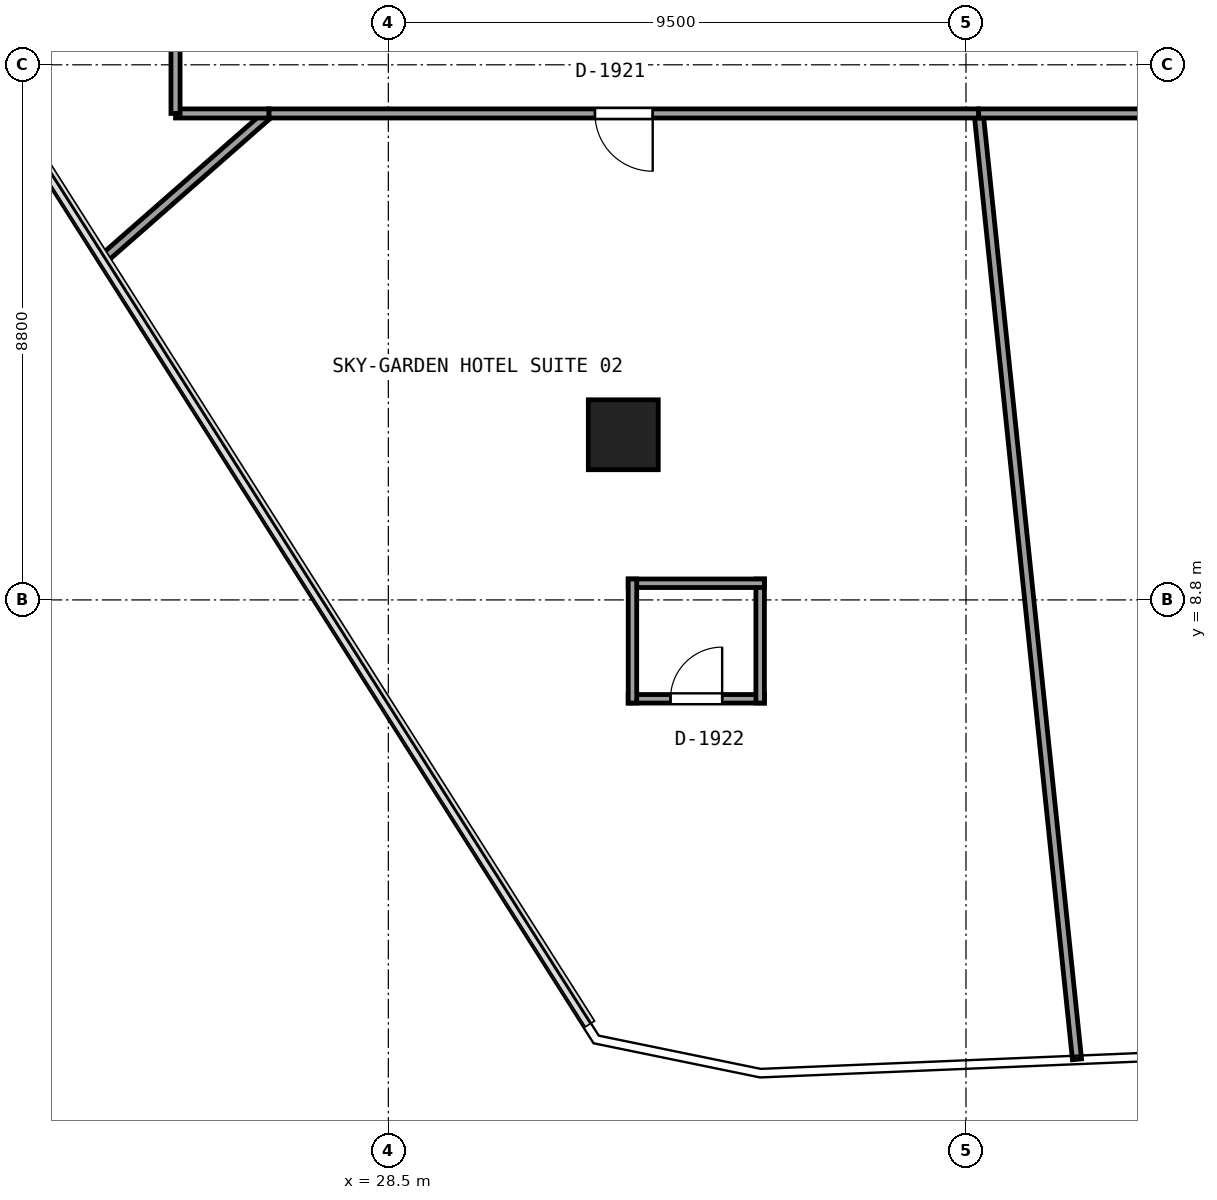
"""IFC4 building model, lengths in metres.
Left out: names, types, materials, properties, quantities, classifications, styles, units other than length and angle.
Written with IfcOpenShell. Run it as: python <this file> out.ifc"""

import sys

from ifc_helpers import new_model, si_unit, direction, frame, frame_2d, origin, origin_2d, place, context, subcontext, project, spatial, rectangle, extrude, element, fill, save


model = new_model("IFC4")
c1 = context("Model", 3, precision=1e-05, world=origin(), true_north=direction((0.0, 1.0)))
c2 = subcontext(c1, "Body", "Model", "MODEL_VIEW")
j1 = project(units=[si_unit("LENGTHUNIT", "METRE"), si_unit("PLANEANGLEUNIT", "RADIAN")], contexts=[c1])
p1 = place(None, origin())
s1 = spatial("IfcSite", under=j1, at=p1, CompositionType="ELEMENT")
p2 = place(p1, origin())
s2 = spatial("IfcBuilding", under=s1, at=p2, CompositionType="ELEMENT")
p3 = place(p2, frame((0.0, 0.0, 76.35)))
s3 = spatial("IfcBuildingStorey", under=s2, at=p3, CompositionType="ELEMENT", Elevation=76.35)
p4 = place(p3, frame((32.364, 11.516, -0.405), z_axis=(0.0, 0.0, 1.0), x_axis=(1.0, 0.0, 0.0)))
e1 = element("IfcColumn", 1, at=p4, inside=s3, PredefinedType="COLUMN", context=c2, shape_type="SweptSolid", body=[
    extrude(rectangle(XDim=1.15, YDim=1.15, at=origin_2d()), origin(), (0.0, 0.0, 1.0), 3.575),
])
p5 = place(p3, frame((32.445, 7.174, 0.0), z_axis=(0.0, 0.0, 1.0), x_axis=(1.0, 0.0, 0.0)))
e2 = element("IfcWall", 2, at=p5, inside=s3, PredefinedType="PARTITIONING", context=c2, shape_type="SweptSolid", body=[
    extrude(rectangle(XDim=2.24, YDim=0.14, at=frame_2d((1.12, 0.0))), origin(), (0.0, 0.0, 1.0), 3.17),
])
p6 = place(p5, frame((0.695, 0.0, 0.0)))
e3 = element("IfcOpeningElement", 3, at=p6, cuts=e2, PredefinedType="OPENING", context=c2, shape_type="SweptSolid", body=[
    extrude(rectangle(XDim=0.85, YDim=2.1, at=frame_2d((0.425, 1.05))), frame((0.0, 0.08, 0.0), z_axis=(0.0, -1.0, 0.0), x_axis=(1.0, 0.0, 0.0)), (0.0, 0.0, 1.0), 0.16),
])
p7 = place(p3, frame((34.615, 7.104, 0.0), z_axis=(0.0, 0.0, 1.0), x_axis=(0.0, 1.0, 0.0)))
e4 = element("IfcWall", 4, at=p7, inside=s3, PredefinedType="PARTITIONING", context=c2, shape_type="SweptSolid", body=[
    extrude(rectangle(XDim=2.04, YDim=0.14, at=frame_2d((1.02, 0.0))), origin(), (0.0, 0.0, 1.0), 3.17),
])
p8 = place(p3, frame((34.685, 9.074, 0.0), z_axis=(0.0, 0.0, 1.0), x_axis=(-1.0, 0.0, 0.0)))
e5 = element("IfcWall", 5, at=p8, inside=s3, PredefinedType="PARTITIONING", context=c2, shape_type="SweptSolid", body=[
    extrude(rectangle(XDim=2.24, YDim=0.14, at=frame_2d((1.12, 0.0))), origin(), (0.0, 0.0, 1.0), 3.17),
])
p9 = place(p3, frame((32.515, 9.144, 0.0), z_axis=(0.0, 0.0, 1.0), x_axis=(0.0, -1.0, 0.0)))
e6 = element("IfcWall", 6, at=p9, inside=s3, PredefinedType="PARTITIONING", context=c2, shape_type="SweptSolid", body=[
    extrude(rectangle(XDim=2.04, YDim=0.14, at=frame_2d((1.02, 0.0))), origin(), (0.0, 0.0, 1.0), 3.17),
])
p10 = place(p3, frame((23.793, 14.391, 0.0), z_axis=(0.0, 0.0, 1.0), x_axis=(0.751631776081, 0.659582953983, 0.0)))
e7 = element("IfcWall", 7, at=p10, inside=s3, PredefinedType="PARTITIONING", context=c2, shape_type="SweptSolid", body=[
    extrude(rectangle(XDim=3.652, YDim=0.15, at=frame_2d((1.826, 0.0))), origin(), (0.0, 0.0, 1.0), 2.455),
])
p11 = place(p3, frame((26.538, 16.8, 0.0), z_axis=(0.0, 0.0, 1.0), x_axis=(-1.0, 0.0, 0.0)))
e8 = element("IfcWall", 8, at=p11, inside=s3, PredefinedType="PARTITIONING", context=c2, shape_type="SweptSolid", body=[
    extrude(rectangle(XDim=1.538, YDim=0.15, at=frame_2d((0.769, 0.0))), origin(), (0.0, 0.0, 1.0), 2.455),
])
p12 = place(p3, frame((25.0, 16.8, 0.0), z_axis=(0.0, 0.0, 1.0), x_axis=(0.0, 1.0, 0.0)))
e9 = element("IfcWall", 9, at=p12, inside=s3, PredefinedType="PARTITIONING", context=c2, shape_type="SweptSolid", body=[
    extrude(rectangle(XDim=1.8, YDim=0.15, at=frame_2d((0.9, 0.0))), origin(), (0.0, 0.0, 1.0), 2.455),
])
p13 = place(p3, frame((39.826, 1.245, 0.0), z_axis=(0.0, 0.0, 1.0), x_axis=(-0.103393409404, 0.994640539538, 0.0)))
e10 = element("IfcWall", 10, at=p13, inside=s3, PredefinedType="PARTITIONING", context=c2, shape_type="SweptSolid", body=[
    extrude(rectangle(XDim=15.639, YDim=0.15, at=frame_2d((7.819, 0.0))), origin(), (0.0, 0.0, 1.0), 2.455),
])
p14 = place(p3, frame((38.209, 16.8, 0.0), z_axis=(0.0, 0.0, 1.0), x_axis=(-1.0, 0.0, 0.0)))
e11 = element("IfcWall", 11, at=p14, inside=s3, PredefinedType="PARTITIONING", context=c2, shape_type="SweptSolid", body=[
    extrude(rectangle(XDim=11.671, YDim=0.15, at=frame_2d((5.835, 0.0))), origin(), (0.0, 0.0, 1.0), 2.455),
])
p15 = place(p14, frame((5.361, 0.0, 0.0)))
e12 = element("IfcOpeningElement", 12, at=p15, cuts=e11, PredefinedType="OPENING", context=c2, shape_type="SweptSolid", body=[
    extrude(rectangle(XDim=0.95, YDim=2.15, at=frame_2d((0.475, 1.075))), frame((0.0, 0.085, 0.0), z_axis=(0.0, -1.0, 0.0), x_axis=(1.0, 0.0, 0.0)), (0.0, 0.0, 1.0), 0.17),
])
p16 = place(p3, frame((49.4, 16.8, 0.0), z_axis=(0.0, 0.0, 1.0), x_axis=(-1.0, 0.0, 0.0)))
e13 = element("IfcWall", 13, at=p16, inside=s3, PredefinedType="PARTITIONING", context=c2, shape_type="SweptSolid", body=[
    extrude(rectangle(XDim=11.191, YDim=0.15, at=frame_2d((5.595, 0.0))), origin(), (0.0, 0.0, 1.0), 2.455),
])
p17 = place(p16, frame((5.12, 0.0, 0.0)))
e14 = element("IfcOpeningElement", 14, at=p17, cuts=e13, PredefinedType="OPENING", context=c2, shape_type="SweptSolid", body=[
    extrude(rectangle(XDim=0.95, YDim=2.15, at=frame_2d((0.475, 1.075))), frame((0.0, 0.085, 0.0), z_axis=(0.0, -1.0, 0.0), x_axis=(1.0, 0.0, 0.0)), (0.0, 0.0, 1.0), 0.17),
])
p18 = place(p15, origin())
e15 = element("IfcDoor", 15, at=p18, inside=s3, OperationType="SINGLE_SWING_LEFT", PredefinedType="DOOR", context=c2, shape_type="SweptSolid", body=[
    extrude(rectangle(XDim=0.95, YDim=2.15, at=frame_2d((0.475, 1.075))), frame((0.0, 0.025, 0.0), z_axis=(0.0, -1.0, 0.0), x_axis=(1.0, 0.0, 0.0)), (0.0, 0.0, 1.0), 0.05),
])
fill(e12, e15)
p19 = place(p6, origin())
e16 = element("IfcDoor", 16, at=p19, inside=s3, OperationType="SINGLE_SWING_RIGHT", PredefinedType="DOOR", context=c2, shape_type="SweptSolid", body=[
    extrude(rectangle(XDim=0.85, YDim=2.1, at=frame_2d((0.425, 1.05))), frame((0.0, 0.025, 0.0), z_axis=(0.0, -1.0, 0.0), x_axis=(1.0, 0.0, 0.0)), (0.0, 0.0, 1.0), 0.05),
])
fill(e3, e16)
save(model, sys.argv[1])
